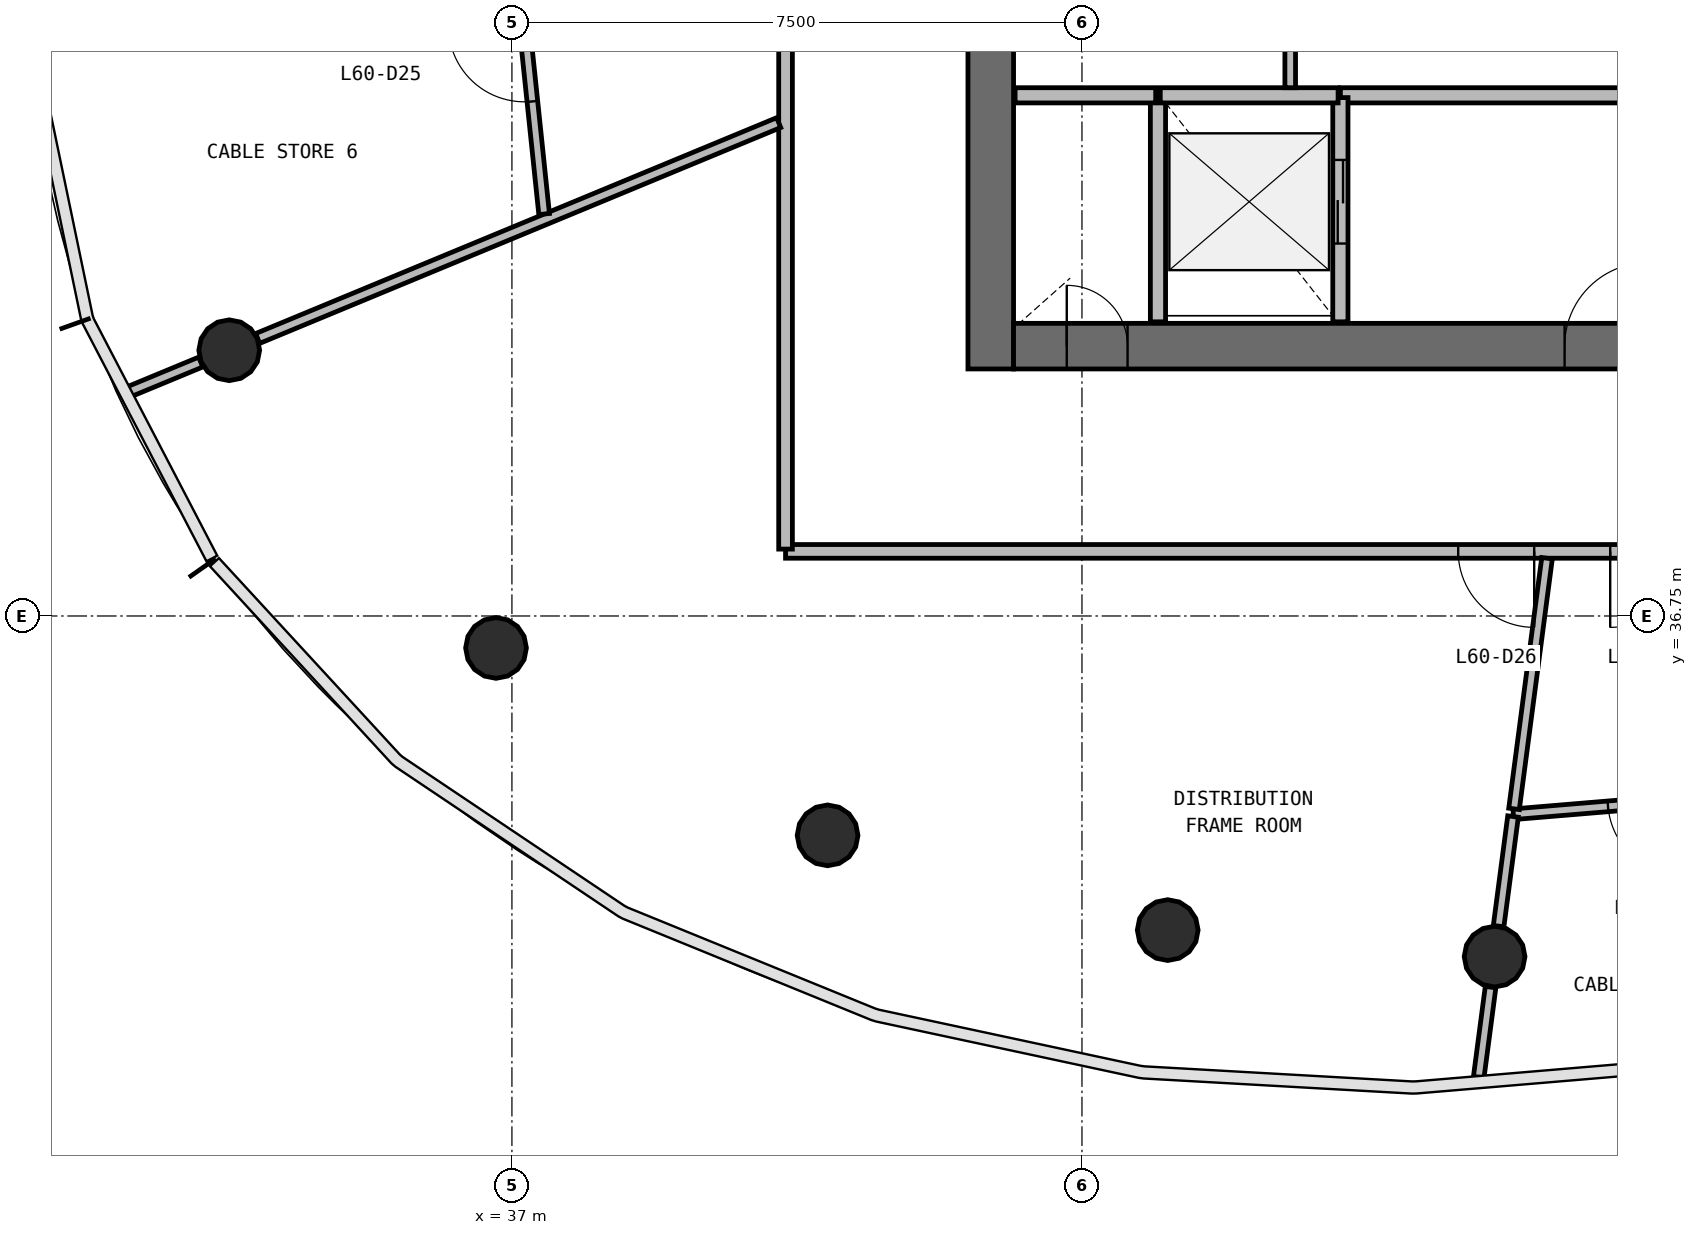
"""IFC4 building model, lengths in metres.
Left out: names, types, materials, properties, quantities, classifications, styles, units other than length and angle.
Written with IfcOpenShell. Run it as: python <this file> out.ifc"""

import sys

from ifc_helpers import new_model, si_unit, direction, frame, frame_2d, origin, origin_2d, place, context, subcontext, project, spatial, rectangle, circle, extrude, source, transform, mapped, element, fill, save


model = new_model("IFC4")
c1 = context("Model", 3, precision=1e-05, world=origin(), true_north=direction((0.0, 1.0)))
c2 = subcontext(c1, "Body", "Model", "MODEL_VIEW")
j1 = project(units=[si_unit("LENGTHUNIT", "METRE"), si_unit("PLANEANGLEUNIT", "RADIAN")], contexts=[c1])
p1 = place(None, origin())
s1 = spatial("IfcSite", under=j1, at=p1, CompositionType="ELEMENT")
p2 = place(p1, origin())
s2 = spatial("IfcBuilding", under=s1, at=p2, CompositionType="ELEMENT")
p3 = place(p2, frame((0.0, 0.0, 246.2)))
s3 = spatial("IfcBuildingStorey", under=s2, at=p3, CompositionType="ELEMENT", Elevation=246.2)
p4 = place(p3, frame((43.3, 56.0, 0.0), z_axis=(0.0, 0.0, 1.0), x_axis=(0.0, -1.0, 0.0)))
e1 = element("IfcWall", 1, at=p4, inside=s3, PredefinedType="SHEAR", context=c2, shape_type="SweptSolid", body=[
    extrude(rectangle(XDim=16.0, YDim=0.6, at=frame_2d((8.0, 0.0))), origin(), (0.0, 0.0, 1.0), 3.9),
])
p5 = place(p4, frame((7.1, 0.0, 0.0)))
e2 = element("IfcOpeningElement", 2, at=p5, cuts=e1, PredefinedType="OPENING", context=c2, shape_type="SweptSolid", body=[
    extrude(rectangle(XDim=1.8, YDim=2.1, at=frame_2d((0.9, 1.05))), frame((0.0, 0.31, 0.0), z_axis=(0.0, -1.0, 0.0), x_axis=(1.0, 0.0, 0.0)), (0.0, 0.0, 1.0), 0.62),
])
p6 = place(p3, frame((43.6, 40.3, 0.0), z_axis=(0.0, 0.0, 1.0), x_axis=(1.0, 0.0, 0.0)))
e3 = element("IfcWall", 3, at=p6, inside=s3, PredefinedType="SHEAR", context=c2, shape_type="SweptSolid", body=[
    extrude(rectangle(XDim=16.8, YDim=0.6, at=frame_2d((8.4, 0.0))), origin(), (0.0, 0.0, 1.0), 3.9),
])
p7 = place(p6, frame((10.3, 0.0, 0.0)))
e4 = element("IfcOpeningElement", 4, at=p7, cuts=e3, PredefinedType="OPENING", context=c2, shape_type="SweptSolid", body=[
    extrude(rectangle(XDim=1.2, YDim=2.1, at=frame_2d((0.6, 1.05))), frame((0.0, 0.31, 0.0), z_axis=(0.0, -1.0, 0.0), x_axis=(1.0, 0.0, 0.0)), (0.0, 0.0, 1.0), 0.62),
])
p8 = place(p6, frame((7.25, 0.0, 0.0)))
e5 = element("IfcOpeningElement", 5, at=p8, cuts=e3, PredefinedType="OPENING", context=c2, shape_type="SweptSolid", body=[
    extrude(rectangle(XDim=1.1, YDim=2.1, at=frame_2d((0.55, 1.05))), frame((0.0, 0.31, 0.0), z_axis=(0.0, -1.0, 0.0), x_axis=(1.0, 0.0, 0.0)), (0.0, 0.0, 1.0), 0.62),
])
p9 = place(p6, frame((0.7, 0.0, 0.0)))
e6 = element("IfcOpeningElement", 6, at=p9, cuts=e3, PredefinedType="OPENING", context=c2, shape_type="SweptSolid", body=[
    extrude(rectangle(XDim=0.8, YDim=2.1, at=frame_2d((0.4, 1.05))), frame((0.0, 0.31, 0.0), z_axis=(0.0, -1.0, 0.0), x_axis=(1.0, 0.0, 0.0)), (0.0, 0.0, 1.0), 0.62),
])
m1 = source(origin(), c2, "Body", "SweptSolid", [
    extrude(circle(Radius=0.4, at=origin_2d()), origin(), (0.0, 0.0, 1.0), 3.9),
])
for number, where, z_axis, x_axis in (
    (7, (33.281, 40.246, 0.0), (0.0, 0.0, 1.0), (1.0, 0.0, 0.0)),
    (8, (36.791, 36.329, 0.0), (0.0, 0.0, 1.0), (1.0, 0.0, 0.0)),
    (9, (41.153, 33.864, 0.0), (0.0, 0.0, 1.0), (1.0, 0.0, 0.0)),
    (10, (45.628, 32.617, 0.0), (0.0, 0.0, 1.0), (1.0, 0.0, 0.0)),
    (11, (49.929, 32.269, 0.0), (0.0, 0.0, 1.0), (1.0, 0.0, 0.0)),
):
    element("IfcColumn", number, at=place(p3, frame(where, z_axis=z_axis, x_axis=x_axis)), inside=s3, PredefinedType="COLUMN", context=c2, shape_type="MappedRepresentation", body=[
        mapped(m1, transform((0.0, 0.0, 0.0), scale=1.0)),
    ])
p10 = place(p3, frame((52.7, 43.6, 0.0), z_axis=(0.0, 0.0, 1.0), x_axis=(-1.0, 0.0, 0.0)))
e12 = element("IfcWall", 12, at=p10, inside=s3, PredefinedType="SOLIDWALL", context=c2, shape_type="SweptSolid", body=[
    extrude(rectangle(XDim=4.8, YDim=0.2, at=frame_2d((2.4, 0.0))), origin(), (0.0, 0.0, 1.0), 3.58),
])
p11 = place(p3, frame((45.5, 43.6, 0.0), z_axis=(0.0, 0.0, 1.0), x_axis=(0.0, -1.0, 0.0)))
e13 = element("IfcWall", 13, at=p11, inside=s3, PredefinedType="SOLIDWALL", context=c2, shape_type="SweptSolid", body=[
    extrude(rectangle(XDim=2.98, YDim=0.2, at=frame_2d((1.49, 0.0))), origin(), (0.0, 0.0, 1.0), 3.58),
])
p12 = place(p3, frame((47.9, 40.62, 0.0), z_axis=(0.0, 0.0, 1.0), x_axis=(0.0, 1.0, 0.0)))
e14 = element("IfcWall", 14, at=p12, inside=s3, PredefinedType="SOLIDWALL", context=c2, shape_type="SweptSolid", body=[
    extrude(rectangle(XDim=2.95, YDim=0.2, at=frame_2d((1.475, 0.0))), origin(), (0.0, 0.0, 1.0), 3.58),
])
p13 = place(p12, frame((1.03, 0.0, 0.0)))
e15 = element("IfcOpeningElement", 15, at=p13, cuts=e14, PredefinedType="OPENING", context=c2, shape_type="SweptSolid", body=[
    extrude(rectangle(XDim=1.1, YDim=2.1, at=frame_2d((0.55, 1.05))), frame((0.0, 0.11, 0.0), z_axis=(0.0, -1.0, 0.0), x_axis=(1.0, 0.0, 0.0)), (0.0, 0.0, 1.0), 0.22),
])
p14 = place(p3, frame((47.87, 43.6, 0.0), z_axis=(0.0, 0.0, 1.0), x_axis=(-1.0, 0.0, 0.0)))
e16 = element("IfcWall", 16, at=p14, inside=s3, PredefinedType="SOLIDWALL", context=c2, shape_type="SweptSolid", body=[
    extrude(rectangle(XDim=2.34, YDim=0.2, at=frame_2d((1.17, 0.0))), origin(), (0.0, 0.0, 1.0), 3.58),
])
p15 = place(p3, frame((45.47, 43.6, 0.0), z_axis=(0.0, 0.0, 1.0), x_axis=(-1.0, 0.0, 0.0)))
e17 = element("IfcWall", 17, at=p15, inside=s3, PredefinedType="SOLIDWALL", context=c2, shape_type="SweptSolid", body=[
    extrude(rectangle(XDim=1.85, YDim=0.2, at=frame_2d((0.925, 0.0))), origin(), (0.0, 0.0, 1.0), 3.58),
])
p16 = place(p3, frame((63.4, 37.6, 0.0), z_axis=(0.0, 0.0, 1.0), x_axis=(-1.0, 0.0, 0.0)))
e18 = element("IfcWall", 18, at=p16, inside=s3, PredefinedType="PARTITIONING", context=c2, shape_type="SweptSolid", body=[
    extrude(rectangle(XDim=22.8, YDim=0.18, at=frame_2d((11.4, 0.0))), origin(), (0.0, 0.0, 1.0), 2.88),
])
p17 = place(p16, frame((12.95, 0.0, 0.0)))
e19 = element("IfcOpeningElement", 19, at=p17, cuts=e18, PredefinedType="OPENING", context=c2, shape_type="SweptSolid", body=[
    extrude(rectangle(XDim=1.0, YDim=2.1, at=frame_2d((0.5, 1.05))), frame((0.0, 0.1, 0.0), z_axis=(0.0, -1.0, 0.0), x_axis=(1.0, 0.0, 0.0)), (0.0, 0.0, 1.0), 0.2),
])
p18 = place(p16, frame((10.95, 0.0, 0.0)))
e20 = element("IfcOpeningElement", 20, at=p18, cuts=e18, PredefinedType="OPENING", context=c2, shape_type="SweptSolid", body=[
    extrude(rectangle(XDim=1.0, YDim=2.1, at=frame_2d((0.5, 1.05))), frame((0.0, 0.1, 0.0), z_axis=(0.0, -1.0, 0.0), x_axis=(1.0, 0.0, 0.0)), (0.0, 0.0, 1.0), 0.2),
])
p19 = place(p3, frame((40.6, 37.63, 0.0), z_axis=(0.0, 0.0, 1.0), x_axis=(0.0, 1.0, 0.0)))
e21 = element("IfcWall", 21, at=p19, inside=s3, PredefinedType="PARTITIONING", context=c2, shape_type="SweptSolid", body=[
    extrude(rectangle(XDim=20.74, YDim=0.18, at=frame_2d((10.37, 0.0))), origin(), (0.0, 0.0, 1.0), 2.88),
])
p20 = place(p19, frame((12.09, 0.0, 0.0)))
e22 = element("IfcOpeningElement", 22, at=p20, cuts=e21, PredefinedType="OPENING", context=c2, shape_type="SweptSolid", body=[
    extrude(rectangle(XDim=1.0, YDim=2.1, at=frame_2d((0.5, 1.05))), frame((0.0, 0.1, 0.0), z_axis=(0.0, -1.0, 0.0), x_axis=(1.0, 0.0, 0.0)), (0.0, 0.0, 1.0), 0.2),
])
p21 = place(p19, frame((9.89, 0.0, 0.0)))
e23 = element("IfcOpeningElement", 23, at=p21, cuts=e21, PredefinedType="OPENING", context=c2, shape_type="SweptSolid", body=[
    extrude(rectangle(XDim=1.0, YDim=2.1, at=frame_2d((0.5, 1.05))), frame((0.0, 0.1, 0.0), z_axis=(0.0, -1.0, 0.0), x_axis=(1.0, 0.0, 0.0)), (0.0, 0.0, 1.0), 0.2),
])
p22 = place(p3, frame((33.655, 40.401, 0.0), z_axis=(0.0, 0.0, 1.0), x_axis=(0.92388089155, 0.38268015134, 0.0)))
e24 = element("IfcWall", 24, at=p22, inside=s3, PredefinedType="PARTITIONING", context=c2, shape_type="SweptSolid", body=[
    extrude(rectangle(XDim=7.42, YDim=0.14, at=frame_2d((3.71, 0.0))), origin(), (0.0, 0.0, 1.0), 2.88),
])
p23 = place(p3, frame((37.424, 42.038, 0.0), z_axis=(0.0, 0.0, 1.0), x_axis=(-0.10392025581, 0.994585632529, 0.0)))
e25 = element("IfcWall", 25, at=p23, inside=s3, PredefinedType="PARTITIONING", context=c2, shape_type="SweptSolid", body=[
    extrude(rectangle(XDim=3.94, YDim=0.14, at=frame_2d((1.97, 0.0))), origin(), (0.0, 0.0, 1.0), 2.88),
])
p24 = place(p23, frame((1.49, 0.0, 0.0)))
e26 = element("IfcOpeningElement", 26, at=p24, cuts=e25, PredefinedType="OPENING", context=c2, shape_type="SweptSolid", body=[
    extrude(rectangle(XDim=1.0, YDim=2.1, at=frame_2d((0.5, 1.05))), frame((0.0, 0.08, 0.0), z_axis=(0.0, -1.0, 0.0), x_axis=(1.0, 0.0, 0.0)), (0.0, 0.0, 1.0), 0.16),
])
p25 = place(p3, frame((53.755, 34.441, 0.0), z_axis=(0.0, 0.0, 1.0), x_axis=(-0.996527452157, -0.083264861121, 0.0)))
e27 = element("IfcWall", 27, at=p25, inside=s3, PredefinedType="PARTITIONING", context=c2, shape_type="SweptSolid", body=[
    extrude(rectangle(XDim=3.592, YDim=0.14, at=frame_2d((1.796, 0.0))), origin(), (0.0, 0.0, 1.0), 2.88),
])
p26 = place(p25, frame((1.342, 0.0, 0.0)))
e28 = element("IfcOpeningElement", 28, at=p26, cuts=e27, PredefinedType="OPENING", context=c2, shape_type="SweptSolid", body=[
    extrude(rectangle(XDim=1.0, YDim=2.1, at=frame_2d((0.5, 1.05))), frame((0.0, 0.08, 0.0), z_axis=(0.0, -1.0, 0.0), x_axis=(1.0, 0.0, 0.0)), (0.0, 0.0, 1.0), 0.16),
])
p27 = place(p3, frame((50.619, 37.51, 0.0), z_axis=(0.0, 0.0, 1.0), x_axis=(-0.130509576708, -0.991447048706, 0.0)))
e29 = element("IfcWall", 29, at=p27, inside=s3, PredefinedType="PARTITIONING", context=c2, shape_type="SweptSolid", body=[
    extrude(rectangle(XDim=3.326, YDim=0.14, at=frame_2d((1.663, 0.0))), origin(), (0.0, 0.0, 1.0), 2.88),
])
p28 = place(p3, frame((47.24, 43.7, 0.0), z_axis=(0.0, 0.0, 1.0), x_axis=(0.0, 1.0, 0.0)))
e30 = element("IfcWall", 30, at=p28, inside=s3, PredefinedType="PARTITIONING", context=c2, shape_type="SweptSolid", body=[
    extrude(rectangle(XDim=2.29, YDim=0.14, at=frame_2d((1.145, 0.0))), origin(), (0.0, 0.0, 1.0), 2.88),
])
p29 = place(p3, frame((50.172, 34.112, 0.0), z_axis=(0.0, 0.0, 1.0), x_axis=(-0.130602153648, -0.991434857902, 0.0)))
e31 = element("IfcWall", 31, at=p29, inside=s3, PredefinedType="PARTITIONING", context=c2, shape_type="SweptSolid", body=[
    extrude(rectangle(XDim=1.454, YDim=0.14, at=frame_2d((0.727, 0.0))), origin(), (0.0, 0.0, 1.0), 2.88),
])
p30 = place(p3, frame((49.876, 31.868, 0.0), z_axis=(0.0, 0.0, 1.0), x_axis=(-0.130570798277, -0.991438987854, 0.0)))
e32 = element("IfcWall", 32, at=p30, inside=s3, PredefinedType="PARTITIONING", context=c2, shape_type="SweptSolid", body=[
    extrude(rectangle(XDim=1.195, YDim=0.14, at=frame_2d((0.597, 0.0))), origin(), (0.0, 0.0, 1.0), 2.88),
])
p31 = place(p3, frame((32.906, 40.091, 0.0), z_axis=(0.0, 0.0, 1.0), x_axis=(-0.92391047829, -0.382608714102, 0.0)))
e33 = element("IfcWall", 33, at=p31, inside=s3, PredefinedType="PARTITIONING", context=c2, shape_type="SweptSolid", body=[
    extrude(rectangle(XDim=1.063, YDim=0.14, at=frame_2d((0.531, 0.0))), origin(), (0.0, 0.0, 1.0), 2.88),
])
m2 = source(origin(), c2, "Body", "SweptSolid", [
    extrude(rectangle(XDim=1.1, YDim=2.1, at=frame_2d((0.55, 1.05))), frame((0.0, 0.025, 0.0), z_axis=(0.0, -1.0, 0.0), x_axis=(1.0, 0.0, 0.0)), (0.0, 0.0, 1.0), 0.05),
])
p32 = place(p13, origin())
e34 = element("IfcDoor", 34, at=p32, inside=s3, OperationType="DOUBLE_DOOR_SLIDING", PredefinedType="USERDEFINED", context=c2, shape_type="MappedRepresentation", body=[
    mapped(m2, transform((0.0, 0.0, 0.0), scale=1.0)),
])
fill(e15, e34)
m3 = source(origin(), c2, "Body", "SweptSolid", [
    extrude(rectangle(XDim=1.1, YDim=2.1, at=frame_2d((0.55, 1.05))), frame((0.0, 0.025, 0.0), z_axis=(0.0, -1.0, 0.0), x_axis=(1.0, 0.0, 0.0)), (0.0, 0.0, 1.0), 0.05),
])
p33 = place(p8, origin())
e35 = element("IfcDoor", 35, at=p33, inside=s3, OperationType="SINGLE_SWING_RIGHT", PredefinedType="DOOR", context=c2, shape_type="MappedRepresentation", body=[
    mapped(m3, transform((0.0, 0.0, 0.0), scale=1.0)),
])
fill(e5, e35)
m4 = source(origin(), c2, "Body", "SweptSolid", [
    extrude(rectangle(XDim=0.8, YDim=2.1, at=frame_2d((0.4, 1.05))), frame((0.0, 0.025, 0.0), z_axis=(0.0, -1.0, 0.0), x_axis=(1.0, 0.0, 0.0)), (0.0, 0.0, 1.0), 0.05),
])
p34 = place(p9, origin())
e36 = element("IfcDoor", 36, at=p34, inside=s3, OperationType="SINGLE_SWING_LEFT", PredefinedType="DOOR", context=c2, shape_type="MappedRepresentation", body=[
    mapped(m4, transform((0.0, 0.0, 0.0), scale=1.0)),
])
fill(e6, e36)
m5 = source(origin(), c2, "Body", "SweptSolid", [
    extrude(rectangle(XDim=1.0, YDim=2.1, at=frame_2d((0.5, 1.05))), frame((0.0, 0.025, 0.0), z_axis=(0.0, -1.0, 0.0), x_axis=(1.0, 0.0, 0.0)), (0.0, 0.0, 1.0), 0.05),
])
p35 = place(p24, origin())
e37 = element("IfcDoor", 37, at=p35, inside=s3, OperationType="SINGLE_SWING_RIGHT", PredefinedType="DOOR", context=c2, shape_type="MappedRepresentation", body=[
    mapped(m5, transform((0.0, 0.0, 0.0), scale=1.0)),
])
fill(e26, e37)
p36 = place(p17, origin())
e38 = element("IfcDoor", 38, at=p36, inside=s3, OperationType="SINGLE_SWING_LEFT", PredefinedType="DOOR", context=c2, shape_type="MappedRepresentation", body=[
    mapped(m5, transform((0.0, 0.0, 0.0), scale=1.0)),
])
fill(e19, e38)
p37 = place(p18, origin())
e39 = element("IfcDoor", 39, at=p37, inside=s3, OperationType="SINGLE_SWING_RIGHT", PredefinedType="DOOR", context=c2, shape_type="MappedRepresentation", body=[
    mapped(m5, transform((0.0, 0.0, 0.0), scale=1.0)),
])
fill(e20, e39)
p38 = place(p26, origin())
e40 = element("IfcDoor", 40, at=p38, inside=s3, OperationType="SINGLE_SWING_LEFT", PredefinedType="DOOR", context=c2, shape_type="MappedRepresentation", body=[
    mapped(m5, transform((0.0, 0.0, 0.0), scale=1.0)),
])
fill(e28, e40)
save(model, sys.argv[1])
